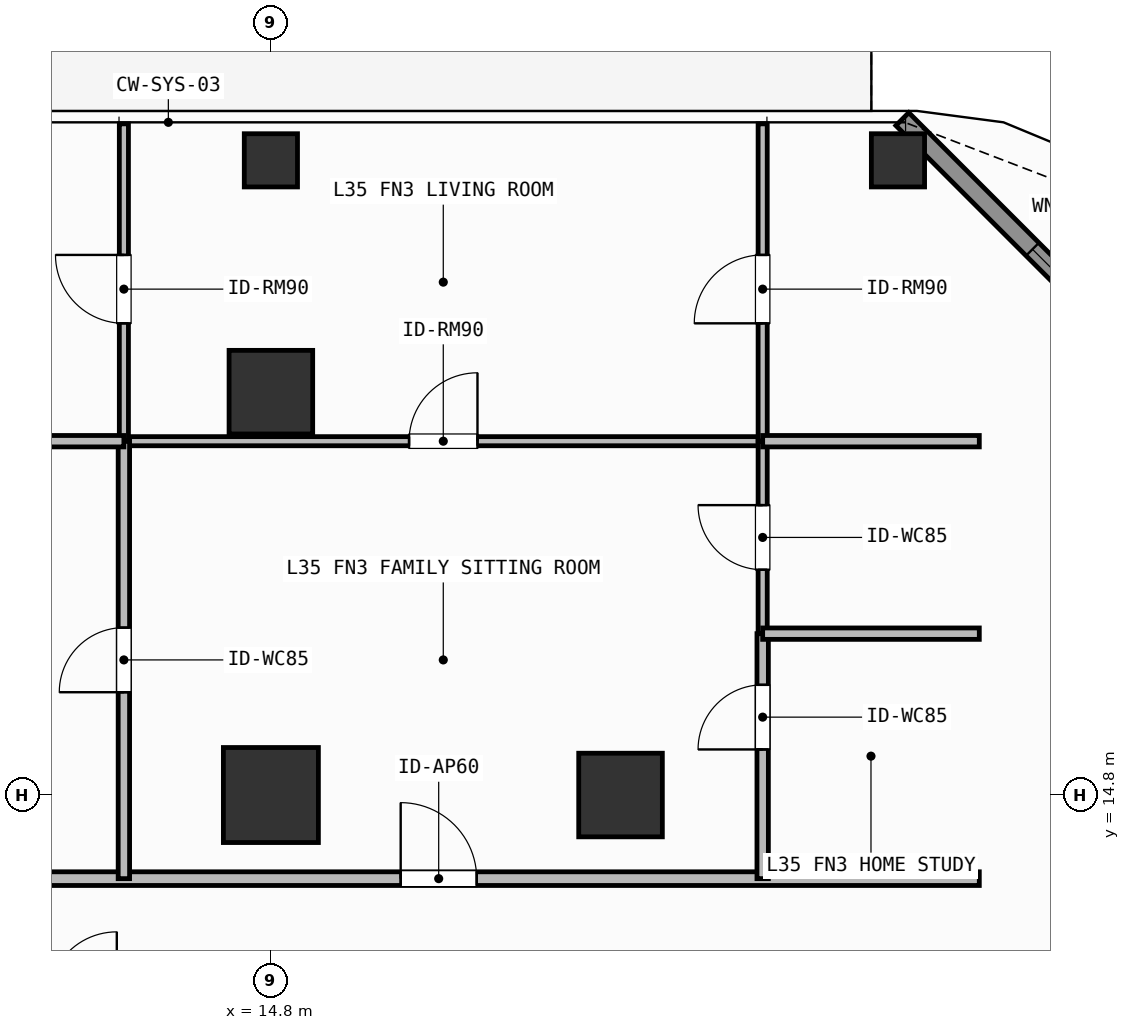
"""IFC4 building model, lengths in metres.
Left out: names, types, materials, properties, quantities, classifications, styles, units other than length and angle.
Written with IfcOpenShell. Run it as: python <this file> out.ifc"""

import sys

from ifc_helpers import new_model, si_unit, direction, frame, frame_2d, origin, origin_2d, place, context, subcontext, project, spatial, rectangle, hollow_rectangle, extrude, element, fill, save


model = new_model("IFC4")
c1 = context("Model", 3, precision=1e-05, world=origin(), true_north=direction((0.0, 1.0)))
c2 = subcontext(c1, "Body", "Model", "MODEL_VIEW")
j1 = project(units=[si_unit("LENGTHUNIT", "METRE"), si_unit("PLANEANGLEUNIT", "RADIAN")], contexts=[c1])
p1 = place(None, origin())
s1 = spatial("IfcSite", under=j1, at=p1, CompositionType="ELEMENT")
p2 = place(p1, origin())
s2 = spatial("IfcBuilding", under=s1, at=p2, CompositionType="ELEMENT")
p3 = place(p2, frame((0.0, 0.0, 140.7)))
s3 = spatial("IfcBuildingStorey", under=s2, at=p3, CompositionType="ELEMENT", Elevation=140.7)
p4 = place(p3, frame((14.8, 14.8, 0.0), z_axis=(0.0, 0.0, 1.0), x_axis=(1.0, 0.0, 0.0)))
e1 = element("IfcColumn", 1, at=p4, inside=s3, PredefinedType="COLUMN", context=c2, shape_type="SweptSolid", body=[
    extrude(rectangle(XDim=1.25, YDim=1.25, at=origin_2d()), origin(), (0.0, 0.0, 1.0), 3.9),
])
for number, where, z_axis, x_axis in (
    (2, (19.4, 14.8, 0.0), (0.0, 0.0, 1.0), (1.0, 0.0, 0.0)),
    (3, (14.8, 20.1, 0.0), (0.0, 0.0, 1.0), (1.0, 0.0, 0.0)),
):
    element("IfcColumn", number, at=place(p3, frame(where, z_axis=z_axis, x_axis=x_axis)), inside=s3, PredefinedType="COLUMN", context=c2, shape_type="SweptSolid", body=[
        extrude(rectangle(XDim=1.1, YDim=1.1, at=origin_2d()), origin(), (0.0, 0.0, 1.0), 3.9),
    ])
for number, where, z_axis, x_axis in (
    (4, (23.05, 23.15, 0.0), (0.0, 0.0, 1.0), (1.0, 0.0, 0.0)),
    (5, (14.8, 23.15, 0.0), (0.0, 0.0, 1.0), (1.0, 0.0, 0.0)),
):
    element("IfcColumn", number, at=place(p3, frame(where, z_axis=z_axis, x_axis=x_axis)), inside=s3, PredefinedType="COLUMN", context=c2, shape_type="SweptSolid", body=[
        extrude(hollow_rectangle(XDim=0.7, YDim=0.7, WallThickness=0.032, at=origin_2d()), origin(), (0.0, 0.0, 1.0), 3.9),
    ])
p5 = place(p3, frame((23.108, 23.692, 0.0), z_axis=(0.0, 0.0, 1.0), x_axis=(0.707087534163, -0.707126027686, 0.0)))
e6 = element("IfcWall", 6, at=p5, inside=s3, PredefinedType="SOLIDWALL", context=c2, shape_type="SweptSolid", body=[
    extrude(rectangle(XDim=6.342, YDim=0.24, at=frame_2d((3.171, 0.0))), origin(), (0.0, 0.0, 1.0), 3.68),
])
p6 = place(p5, frame((2.421, 0.0, 0.8)))
e7 = element("IfcOpeningElement", 7, at=p6, cuts=e6, PredefinedType="OPENING", context=c2, shape_type="SweptSolid", body=[
    extrude(rectangle(XDim=1.5, YDim=1.85, at=frame_2d((0.75, 0.925))), frame((0.0, 0.13, 0.0), z_axis=(0.0, -1.0, 0.0), x_axis=(1.0, 0.0, 0.0)), (0.0, 0.0, 1.0), 0.26),
])
p7 = place(p3, frame((8.82, 13.7, 0.0), z_axis=(0.0, 0.0, 1.0), x_axis=(1.0, 0.0, 0.0)))
e8 = element("IfcWall", 8, at=p7, inside=s3, PredefinedType="PARTITIONING", context=c2, shape_type="SweptSolid", body=[
    extrude(rectangle(XDim=15.3, YDim=0.18, at=frame_2d((7.65, 0.0))), origin(), (0.0, 0.0, 1.0), 3.68),
])
p8 = place(p7, frame((7.688, 0.0, 0.0)))
e9 = element("IfcOpeningElement", 9, at=p8, cuts=e8, PredefinedType="OPENING", context=c2, shape_type="SweptSolid", body=[
    extrude(rectangle(XDim=1.0, YDim=2.2, at=frame_2d((0.5, 1.1))), frame((0.0, 0.1, 0.0), z_axis=(0.0, -1.0, 0.0), x_axis=(1.0, 0.0, 0.0)), (0.0, 0.0, 1.0), 0.2),
])
p9 = place(p3, frame((12.866, 19.455, 0.0), z_axis=(0.0, 0.0, 1.0), x_axis=(1.0, 0.0, 0.0)))
e10 = element("IfcWall", 10, at=p9, inside=s3, PredefinedType="PARTITIONING", context=c2, shape_type="SweptSolid", body=[
    extrude(rectangle(XDim=8.404, YDim=0.12, at=frame_2d((4.202, 0.0))), origin(), (0.0, 0.0, 1.0), 3.68),
])
p10 = place(p9, frame((3.752, 0.0, 0.0)))
e11 = element("IfcOpeningElement", 11, at=p10, cuts=e10, PredefinedType="OPENING", context=c2, shape_type="SweptSolid", body=[
    extrude(rectangle(XDim=0.9, YDim=2.1, at=frame_2d((0.45, 1.05))), frame((0.0, 0.07, 0.0), z_axis=(0.0, -1.0, 0.0), x_axis=(1.0, 0.0, 0.0)), (0.0, 0.0, 1.0), 0.14),
])
p11 = place(p3, frame((12.866, 13.7, 0.0), z_axis=(0.0, 0.0, 1.0), x_axis=(0.0, 1.0, 0.0)))
e12 = element("IfcWall", 12, at=p11, inside=s3, PredefinedType="PARTITIONING", context=c2, shape_type="SweptSolid", body=[
    extrude(rectangle(XDim=5.755, YDim=0.15, at=frame_2d((2.877, 0.0))), origin(), (0.0, 0.0, 1.0), 3.68),
])
p12 = place(p11, frame((2.452, 0.0, 0.0)))
e13 = element("IfcOpeningElement", 13, at=p12, cuts=e12, PredefinedType="OPENING", context=c2, shape_type="SweptSolid", body=[
    extrude(rectangle(XDim=0.85, YDim=2.1, at=frame_2d((0.425, 1.05))), frame((0.0, 0.085, 0.0), z_axis=(0.0, -1.0, 0.0), x_axis=(1.0, 0.0, 0.0)), (0.0, 0.0, 1.0), 0.17),
])
p13 = place(p3, frame((12.866, 19.455, 0.0), z_axis=(0.0, 0.0, 1.0), x_axis=(0.0, 1.0, 0.0)))
e14 = element("IfcWall", 14, at=p13, inside=s3, PredefinedType="PARTITIONING", context=c2, shape_type="SweptSolid", body=[
    extrude(rectangle(XDim=4.175, YDim=0.12, at=frame_2d((2.087, 0.0))), origin(), (0.0, 0.0, 1.0), 3.68),
])
p14 = place(p13, frame((1.551, 0.0, 0.0)))
e15 = element("IfcOpeningElement", 15, at=p14, cuts=e14, PredefinedType="OPENING", context=c2, shape_type="SweptSolid", body=[
    extrude(rectangle(XDim=0.9, YDim=2.1, at=frame_2d((0.45, 1.05))), frame((0.0, 0.07, 0.0), z_axis=(0.0, -1.0, 0.0), x_axis=(1.0, 0.0, 0.0)), (0.0, 0.0, 1.0), 0.14),
])
p15 = place(p3, frame((21.27, 13.7, 0.0), z_axis=(0.0, 0.0, 1.0), x_axis=(0.0, 1.0, 0.0)))
e16 = element("IfcWall", 16, at=p15, inside=s3, PredefinedType="PARTITIONING", context=c2, shape_type="SweptSolid", body=[
    extrude(rectangle(XDim=3.223, YDim=0.15, at=frame_2d((1.612, 0.0))), origin(), (0.0, 0.0, 1.0), 3.68),
])
p16 = place(p15, frame((1.7, 0.0, 0.0)))
e17 = element("IfcOpeningElement", 17, at=p16, cuts=e16, PredefinedType="OPENING", context=c2, shape_type="SweptSolid", body=[
    extrude(rectangle(XDim=0.85, YDim=2.1, at=frame_2d((0.425, 1.05))), frame((0.0, 0.085, 0.0), z_axis=(0.0, -1.0, 0.0), x_axis=(1.0, 0.0, 0.0)), (0.0, 0.0, 1.0), 0.17),
])
p17 = place(p3, frame((21.27, 16.923, 0.0), z_axis=(0.0, 0.0, 1.0), x_axis=(0.0, 1.0, 0.0)))
e18 = element("IfcWall", 18, at=p17, inside=s3, PredefinedType="PARTITIONING", context=c2, shape_type="SweptSolid", body=[
    extrude(rectangle(XDim=2.532, YDim=0.12, at=frame_2d((1.266, 0.0))), origin(), (0.0, 0.0, 1.0), 3.68),
])
p18 = place(p17, frame((0.841, 0.0, 0.0)))
e19 = element("IfcOpeningElement", 19, at=p18, cuts=e18, PredefinedType="OPENING", context=c2, shape_type="SweptSolid", body=[
    extrude(rectangle(XDim=0.85, YDim=2.1, at=frame_2d((0.425, 1.05))), frame((0.0, 0.07, 0.0), z_axis=(0.0, -1.0, 0.0), x_axis=(1.0, 0.0, 0.0)), (0.0, 0.0, 1.0), 0.14),
])
p19 = place(p3, frame((21.27, 19.455, 0.0), z_axis=(0.0, 0.0, 1.0), x_axis=(0.0, 1.0, 0.0)))
e20 = element("IfcWall", 20, at=p19, inside=s3, PredefinedType="PARTITIONING", context=c2, shape_type="SweptSolid", body=[
    extrude(rectangle(XDim=4.175, YDim=0.12, at=frame_2d((2.087, 0.0))), origin(), (0.0, 0.0, 1.0), 3.68),
])
p20 = place(p19, frame((1.551, 0.0, 0.0)))
e21 = element("IfcOpeningElement", 21, at=p20, cuts=e20, PredefinedType="OPENING", context=c2, shape_type="SweptSolid", body=[
    extrude(rectangle(XDim=0.9, YDim=2.1, at=frame_2d((0.45, 1.05))), frame((0.0, 0.07, 0.0), z_axis=(0.0, -1.0, 0.0), x_axis=(1.0, 0.0, 0.0)), (0.0, 0.0, 1.0), 0.14),
])
p21 = place(p3, frame((8.82, 19.455, 0.0), z_axis=(0.0, 0.0, 1.0), x_axis=(1.0, 0.0, 0.0)))
e22 = element("IfcWall", 22, at=p21, inside=s3, PredefinedType="PARTITIONING", context=c2, shape_type="SweptSolid", body=[
    extrude(rectangle(XDim=4.046, YDim=0.15, at=frame_2d((2.023, 0.0))), origin(), (0.0, 0.0, 1.0), 3.68),
])
for number, where, z_axis, x_axis in (
    (23, (21.27, 16.923, 0.0), (0.0, 0.0, 1.0), (1.0, 0.0, 0.0)),
    (24, (21.27, 19.455, 0.0), (0.0, 0.0, 1.0), (1.0, 0.0, 0.0)),
):
    element("IfcWall", number, at=place(p3, frame(where, z_axis=z_axis, x_axis=x_axis)), inside=s3, PredefinedType="PARTITIONING", context=c2, shape_type="SweptSolid", body=[
        extrude(rectangle(XDim=2.85, YDim=0.15, at=frame_2d((1.425, 0.0))), origin(), (0.0, 0.0, 1.0), 3.68),
    ])
p22 = place(p6, origin())
e25 = element("IfcWindow", 25, at=p22, inside=s3, PartitioningType="SINGLE_PANEL", PredefinedType="WINDOW", context=c2, shape_type="SweptSolid", body=[
    extrude(rectangle(XDim=1.5, YDim=1.85, at=frame_2d((0.75, 0.925))), frame((0.0, 0.03, 0.0), z_axis=(0.0, -1.0, 0.0), x_axis=(1.0, 0.0, 0.0)), (0.0, 0.0, 1.0), 0.06),
])
fill(e7, e25)
p23 = place(p8, origin())
e26 = element("IfcDoor", 26, at=p23, inside=s3, OperationType="SINGLE_SWING_LEFT", PredefinedType="DOOR", context=c2, shape_type="SweptSolid", body=[
    extrude(rectangle(XDim=1.0, YDim=2.2, at=frame_2d((0.5, 1.1))), frame((0.0, 0.025, 0.0), z_axis=(0.0, -1.0, 0.0), x_axis=(1.0, 0.0, 0.0)), (0.0, 0.0, 1.0), 0.05),
])
fill(e9, e26)
p24 = place(p10, origin())
e27 = element("IfcDoor", 27, at=p24, inside=s3, OperationType="SINGLE_SWING_RIGHT", PredefinedType="DOOR", context=c2, shape_type="SweptSolid", body=[
    extrude(rectangle(XDim=0.9, YDim=2.1, at=frame_2d((0.45, 1.05))), frame((0.0, 0.025, 0.0), z_axis=(0.0, -1.0, 0.0), x_axis=(1.0, 0.0, 0.0)), (0.0, 0.0, 1.0), 0.05),
])
fill(e11, e27)
p25 = place(p12, origin())
e28 = element("IfcDoor", 28, at=p25, inside=s3, OperationType="SINGLE_SWING_LEFT", PredefinedType="DOOR", context=c2, shape_type="SweptSolid", body=[
    extrude(rectangle(XDim=0.85, YDim=2.1, at=frame_2d((0.425, 1.05))), frame((0.0, 0.025, 0.0), z_axis=(0.0, -1.0, 0.0), x_axis=(1.0, 0.0, 0.0)), (0.0, 0.0, 1.0), 0.05),
])
fill(e13, e28)
p26 = place(p14, origin())
e29 = element("IfcDoor", 29, at=p26, inside=s3, OperationType="SINGLE_SWING_RIGHT", PredefinedType="DOOR", context=c2, shape_type="SweptSolid", body=[
    extrude(rectangle(XDim=0.9, YDim=2.1, at=frame_2d((0.45, 1.05))), frame((0.0, 0.025, 0.0), z_axis=(0.0, -1.0, 0.0), x_axis=(1.0, 0.0, 0.0)), (0.0, 0.0, 1.0), 0.05),
])
fill(e15, e29)
p27 = place(p16, origin())
e30 = element("IfcDoor", 30, at=p27, inside=s3, OperationType="SINGLE_SWING_LEFT", PredefinedType="DOOR", context=c2, shape_type="SweptSolid", body=[
    extrude(rectangle(XDim=0.85, YDim=2.1, at=frame_2d((0.425, 1.05))), frame((0.0, 0.025, 0.0), z_axis=(0.0, -1.0, 0.0), x_axis=(1.0, 0.0, 0.0)), (0.0, 0.0, 1.0), 0.05),
])
fill(e17, e30)
p28 = place(p18, origin())
e31 = element("IfcDoor", 31, at=p28, inside=s3, OperationType="SINGLE_SWING_RIGHT", PredefinedType="DOOR", context=c2, shape_type="SweptSolid", body=[
    extrude(rectangle(XDim=0.85, YDim=2.1, at=frame_2d((0.425, 1.05))), frame((0.0, 0.025, 0.0), z_axis=(0.0, -1.0, 0.0), x_axis=(1.0, 0.0, 0.0)), (0.0, 0.0, 1.0), 0.05),
])
fill(e19, e31)
p29 = place(p20, origin())
e32 = element("IfcDoor", 32, at=p29, inside=s3, OperationType="SINGLE_SWING_LEFT", PredefinedType="DOOR", context=c2, shape_type="SweptSolid", body=[
    extrude(rectangle(XDim=0.9, YDim=2.1, at=frame_2d((0.45, 1.05))), frame((0.0, 0.025, 0.0), z_axis=(0.0, -1.0, 0.0), x_axis=(1.0, 0.0, 0.0)), (0.0, 0.0, 1.0), 0.05),
])
fill(e21, e32)
save(model, sys.argv[1])
